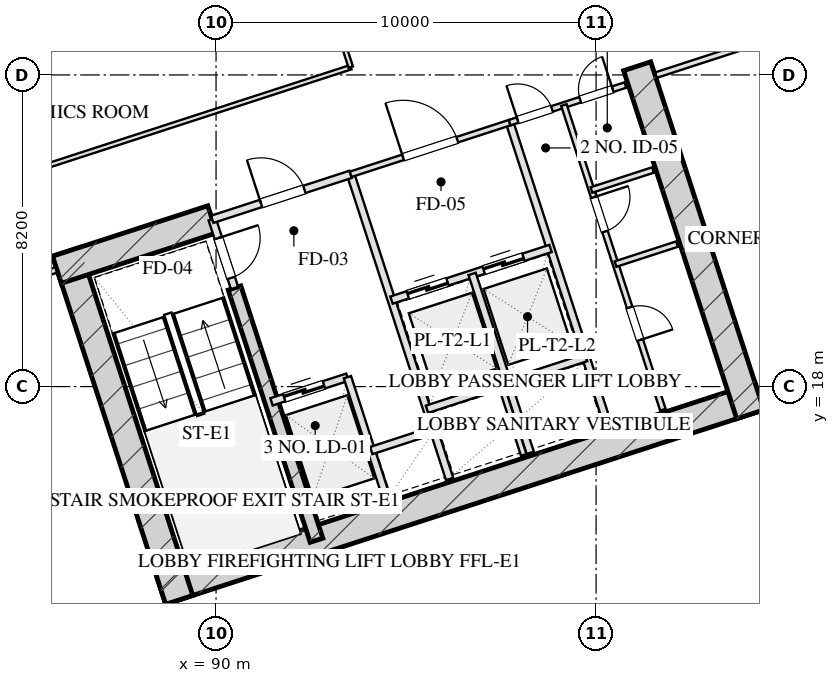
"""IFC4 building model, lengths in metres.
Left out: names, types, materials, properties, quantities, classifications, styles, units other than length and angle.
Written with IfcOpenShell. Run it as: python <this file> out.ifc"""

import sys

from ifc_helpers import new_model, si_unit, direction, frame, frame_2d, origin, place, context, subcontext, project, spatial, rectangle, extrude, element, fill, save


model = new_model("IFC4")
c1 = context("Model", 3, precision=1e-05, world=origin(), true_north=direction((0.0, 1.0)))
c2 = subcontext(c1, "Body", "Model", "MODEL_VIEW")
j1 = project(units=[si_unit("LENGTHUNIT", "METRE"), si_unit("PLANEANGLEUNIT", "RADIAN")], contexts=[c1])
p1 = place(None, origin())
s1 = spatial("IfcSite", under=j1, at=p1, CompositionType="ELEMENT")
p2 = place(p1, origin())
s2 = spatial("IfcBuilding", under=s1, at=p2, CompositionType="ELEMENT")
p3 = place(p2, frame((0.0, 0.0, 85.1)))
s3 = spatial("IfcBuildingStorey", under=s2, at=p3, CompositionType="ELEMENT", Elevation=85.1)
p4 = place(p3, frame((88.559, 12.629, 0.0), z_axis=(0.0, 0.0, 1.0), x_axis=(0.951056072937, 0.309018358888, 0.0)))
e1 = element("IfcWall", 1, at=p4, inside=s3, PredefinedType="SHEAR", context=c2, shape_type="SweptSolid", body=[
    extrude(rectangle(XDim=16.55, YDim=0.75, at=frame_2d((8.275, 0.0))), origin(), (0.0, 0.0, 1.0), 3.45),
])
p5 = place(p3, frame((86.055, 21.546, 0.0), z_axis=(0.0, 0.0, 1.0), x_axis=(0.309023585745, -0.951054374604, 0.0)))
e2 = element("IfcWall", 2, at=p5, inside=s3, PredefinedType="SHEAR", context=c2, shape_type="SweptSolid", body=[
    extrude(rectangle(XDim=9.63, YDim=0.75, at=frame_2d((4.815, 0.0))), origin(), (0.0, 0.0, 1.0), 3.45),
])
p6 = place(p3, frame((101.082, 26.429, 0.0), z_axis=(0.0, 0.0, 1.0), x_axis=(0.309016134813, -0.951056795583, 0.0)))
e3 = element("IfcWall", 3, at=p6, inside=s3, PredefinedType="SHEAR", context=c2, shape_type="SweptSolid", body=[
    extrude(rectangle(XDim=9.63, YDim=0.75, at=frame_2d((4.815, 0.0))), origin(), (0.0, 0.0, 1.0), 3.45),
])
p7 = place(p3, frame((90.486, 20.594, 0.0), z_axis=(0.0, 0.0, 1.0), x_axis=(0.309020428229, -0.951055400562, 0.0)))
e4 = element("IfcWall", 4, at=p7, inside=s3, PredefinedType="SHEAR", context=c2, shape_type="SweptSolid", body=[
    extrude(rectangle(XDim=6.98, YDim=0.35, at=frame_2d((3.49, 0.0))), origin(), (0.0, 0.0, 1.0), 3.45),
])
p8 = place(p3, frame((85.814, 21.074, 0.0), z_axis=(0.0, 0.0, 1.0), x_axis=(0.95106580992, 0.308988390074, 0.0)))
e5 = element("IfcWall", 5, at=p8, inside=s3, PredefinedType="SHEAR", context=c2, shape_type="SweptSolid", body=[
    extrude(rectangle(XDim=4.295, YDim=0.75, at=frame_2d((2.147, 0.0))), origin(), (0.0, 0.0, 1.0), 3.45),
])
p9 = place(p3, frame((99.284, 61.41, 0.0), z_axis=(0.0, 0.0, 1.0), x_axis=(0.309017542002, -0.95105633836, 0.0)))
e6 = element("IfcWall", 6, at=p9, inside=s3, PredefinedType="SOLIDWALL", context=c2, shape_type="SweptSolid", body=[
    extrude(rectangle(XDim=46.4, YDim=0.4, at=frame_2d((23.2, 0.0))), origin(), (0.0, 0.0, 1.0), 2.61),
])
p10 = place(p9, frame((28.4, 0.0, 0.75)))
e7 = element("IfcOpeningElement", 7, at=p10, cuts=e6, PredefinedType="OPENING", context=c2, shape_type="SweptSolid", body=[
    extrude(rectangle(XDim=2.4, YDim=1.46, at=frame_2d((1.2, 0.73))), frame((0.0, 0.21, 0.0), z_axis=(0.0, -1.0, 0.0), x_axis=(1.0, 0.0, 0.0)), (0.0, 0.0, 1.0), 0.42),
])
p11 = place(p9, frame((19.4, 0.0, 0.75)))
e8 = element("IfcOpeningElement", 8, at=p11, cuts=e6, PredefinedType="OPENING", context=c2, shape_type="SweptSolid", body=[
    extrude(rectangle(XDim=2.4, YDim=1.46, at=frame_2d((1.2, 0.73))), frame((0.0, 0.21, 0.0), z_axis=(0.0, -1.0, 0.0), x_axis=(1.0, 0.0, 0.0)), (0.0, 0.0, 1.0), 0.42),
])
p12 = place(p9, frame((15.6, 0.0, 0.75)))
e9 = element("IfcOpeningElement", 9, at=p12, cuts=e6, PredefinedType="OPENING", context=c2, shape_type="SweptSolid", body=[
    extrude(rectangle(XDim=2.4, YDim=1.46, at=frame_2d((1.2, 0.73))), frame((0.0, 0.21, 0.0), z_axis=(0.0, -1.0, 0.0), x_axis=(1.0, 0.0, 0.0)), (0.0, 0.0, 1.0), 0.42),
])
p13 = place(p3, frame((111.953, 14.005, 0.0), z_axis=(0.0, 0.0, 1.0), x_axis=(-0.95105505922, -0.309021478754, 0.0)))
e10 = element("IfcWall", 10, at=p13, inside=s3, PredefinedType="SOLIDWALL", context=c2, shape_type="SweptSolid", body=[
    extrude(rectangle(XDim=29.4, YDim=0.4, at=frame_2d((14.7, 0.0))), origin(), (0.0, 0.0, 1.0), 2.61),
])
p14 = place(p3, frame((89.899, 22.401, 0.0), z_axis=(0.0, 0.0, 1.0), x_axis=(0.308932062672, -0.951084108086, 0.0)))
e11 = element("IfcWall", 11, at=p14, inside=s3, PredefinedType="PARTITIONING", context=c2, shape_type="SweptSolid", body=[
    extrude(rectangle(XDim=1.9, YDim=0.2, at=frame_2d((0.95, 0.0))), origin(), (0.0, 0.0, 1.0), 3.175),
])
p15 = place(p14, frame((0.52, 0.0, 0.0)))
e12 = element("IfcOpeningElement", 12, at=p15, cuts=e11, PredefinedType="OPENING", context=c2, shape_type="SweptSolid", body=[
    extrude(rectangle(XDim=1.1, YDim=2.05, at=frame_2d((0.55, 1.025))), frame((0.0, 0.11, 0.0), z_axis=(0.0, -1.0, 0.0), x_axis=(1.0, 0.0, 0.0)), (0.0, 0.0, 1.0), 0.22),
])
p16 = place(p3, frame((93.542, 23.585, 0.0), z_axis=(0.0, 0.0, 1.0), x_axis=(0.309042196757, -0.951048327176, 0.0)))
e13 = element("IfcWall", 13, at=p16, inside=s3, PredefinedType="PARTITIONING", context=c2, shape_type="SweptSolid", body=[
    extrude(rectangle(XDim=8.43, YDim=0.2, at=frame_2d((4.215, 0.0))), origin(), (0.0, 0.0, 1.0), 3.175),
])
p17 = place(p3, frame((89.899, 22.401, 0.0), z_axis=(0.0, 0.0, 1.0), x_axis=(0.951046716504, 0.309047153403, 0.0)))
e14 = element("IfcWall", 14, at=p17, inside=s3, PredefinedType="PARTITIONING", context=c2, shape_type="SweptSolid", body=[
    extrude(rectangle(XDim=3.83, YDim=0.2, at=frame_2d((1.915, 0.0))), origin(), (0.0, 0.0, 1.0), 3.175),
])
p18 = place(p17, frame((1.35, 0.0, 0.0)))
e15 = element("IfcOpeningElement", 15, at=p18, cuts=e14, PredefinedType="OPENING", context=c2, shape_type="SweptSolid", body=[
    extrude(rectangle(XDim=1.2, YDim=2.05, at=frame_2d((0.6, 1.025))), frame((0.0, 0.11, 0.0), z_axis=(0.0, -1.0, 0.0), x_axis=(1.0, 0.0, 0.0)), (0.0, 0.0, 1.0), 0.22),
])
p19 = place(p3, frame((91.46, 17.598, 0.0), z_axis=(0.0, 0.0, 1.0), x_axis=(0.951062257173, 0.308999325213, 0.0)))
e16 = element("IfcWall", 16, at=p19, inside=s3, PredefinedType="PARTITIONING", context=c2, shape_type="SweptSolid", body=[
    extrude(rectangle(XDim=2.1, YDim=0.2, at=frame_2d((1.05, 0.0))), origin(), (0.0, 0.0, 1.0), 3.175),
])
p20 = place(p19, frame((0.35, 0.0, 0.0)))
e17 = element("IfcOpeningElement", 17, at=p20, cuts=e16, PredefinedType="OPENING", context=c2, shape_type="SweptSolid", body=[
    extrude(rectangle(XDim=1.1, YDim=2.05, at=frame_2d((0.55, 1.025))), frame((0.0, 0.11, 0.0), z_axis=(0.0, -1.0, 0.0), x_axis=(1.0, 0.0, 0.0)), (0.0, 0.0, 1.0), 0.22),
])
p21 = place(p3, frame((93.457, 18.247, 0.0), z_axis=(0.0, 0.0, 1.0), x_axis=(0.3089935693, -0.951064127245, 0.0)))
e18 = element("IfcWall", 18, at=p21, inside=s3, PredefinedType="PARTITIONING", context=c2, shape_type="SweptSolid", body=[
    extrude(rectangle(XDim=3.7, YDim=0.2, at=frame_2d((1.85, 0.0))), origin(), (0.0, 0.0, 1.0), 3.175),
])
p22 = place(p3, frame((94.084, 16.317, 0.0), z_axis=(0.0, 0.0, 1.0), x_axis=(0.951041328149, 0.309063734775, 0.0)))
e19 = element("IfcWall", 19, at=p22, inside=s3, PredefinedType="PARTITIONING", context=c2, shape_type="SweptSolid", body=[
    extrude(rectangle(XDim=1.73, YDim=0.2, at=frame_2d((0.865, 0.0))), origin(), (0.0, 0.0, 1.0), 3.175),
])
p23 = place(p3, frame((97.727, 24.944, 0.0), z_axis=(0.0, 0.0, 1.0), x_axis=(0.309016001439, -0.951056838919, 0.0)))
e20 = element("IfcWall", 20, at=p23, inside=s3, PredefinedType="PARTITIONING", context=c2, shape_type="SweptSolid", body=[
    extrude(rectangle(XDim=8.43, YDim=0.2, at=frame_2d((4.215, 0.0))), origin(), (0.0, 0.0, 1.0), 3.175),
])
p24 = place(p3, frame((93.542, 23.585, 0.0), z_axis=(0.0, 0.0, 1.0), x_axis=(0.951063829732, 0.308994485023, 0.0)))
e21 = element("IfcWall", 21, at=p24, inside=s3, PredefinedType="PARTITIONING", context=c2, shape_type="SweptSolid", body=[
    extrude(rectangle(XDim=4.4, YDim=0.15, at=frame_2d((2.2, 0.0))), origin(), (0.0, 0.0, 1.0), 3.175),
])
p25 = place(p24, frame((1.45, 0.0, 0.0)))
e22 = element("IfcOpeningElement", 22, at=p25, cuts=e21, PredefinedType="OPENING", context=c2, shape_type="SweptSolid", body=[
    extrude(rectangle(XDim=1.5, YDim=2.05, at=frame_2d((0.75, 1.025))), frame((0.0, 0.085, 0.0), z_axis=(0.0, -1.0, 0.0), x_axis=(1.0, 0.0, 0.0)), (0.0, 0.0, 1.0), 0.17),
])
p26 = place(p3, frame((94.617, 20.275, 0.0), z_axis=(0.0, 0.0, 1.0), x_axis=(0.951058531764, 0.30901079133, 0.0)))
e23 = element("IfcWall", 23, at=p26, inside=s3, PredefinedType="PARTITIONING", context=c2, shape_type="SweptSolid", body=[
    extrude(rectangle(XDim=4.4, YDim=0.2, at=frame_2d((2.2, 0.0))), origin(), (0.0, 0.0, 1.0), 3.175),
])
p27 = place(p26, frame((0.45, 0.0, 0.0)))
e24 = element("IfcOpeningElement", 24, at=p27, cuts=e23, PredefinedType="OPENING", context=c2, shape_type="SweptSolid", body=[
    extrude(rectangle(XDim=1.1, YDim=2.05, at=frame_2d((0.55, 1.025))), frame((0.0, 0.11, 0.0), z_axis=(0.0, -1.0, 0.0), x_axis=(1.0, 0.0, 0.0)), (0.0, 0.0, 1.0), 0.22),
])
p28 = place(p26, frame((2.55, 0.0, 0.0)))
e25 = element("IfcOpeningElement", 25, at=p28, cuts=e23, PredefinedType="OPENING", context=c2, shape_type="SweptSolid", body=[
    extrude(rectangle(XDim=1.1, YDim=2.05, at=frame_2d((0.55, 1.025))), frame((0.0, 0.11, 0.0), z_axis=(0.0, -1.0, 0.0), x_axis=(1.0, 0.0, 0.0)), (0.0, 0.0, 1.0), 0.22),
])
p29 = place(p3, frame((96.738, 20.964, 0.0), z_axis=(0.0, 0.0, 1.0), x_axis=(0.309042578481, -0.951048203135, 0.0)))
e26 = element("IfcWall", 26, at=p29, inside=s3, PredefinedType="PARTITIONING", context=c2, shape_type="SweptSolid", body=[
    extrude(rectangle(XDim=4.95, YDim=0.2, at=frame_2d((2.475, 0.0))), origin(), (0.0, 0.0, 1.0), 3.175),
])
p30 = place(p3, frame((95.551, 17.403, 0.0), z_axis=(0.0, 0.0, 1.0), x_axis=(0.951058531764, 0.30901079133, 0.0)))
e27 = element("IfcWall", 27, at=p30, inside=s3, PredefinedType="PARTITIONING", context=c2, shape_type="SweptSolid", body=[
    extrude(rectangle(XDim=4.4, YDim=0.2, at=frame_2d((2.2, 0.0))), origin(), (0.0, 0.0, 1.0), 3.175),
])
p31 = place(p3, frame((97.516, 17.989, 0.0), z_axis=(0.0, 0.0, 1.0), x_axis=(0.30897153969, -0.951071284217, 0.0)))
e28 = element("IfcWall", 28, at=p31, inside=s3, PredefinedType="PARTITIONING", context=c2, shape_type="SweptSolid", body=[
    extrude(rectangle(XDim=1.88, YDim=0.15, at=frame_2d((0.94, 0.0))), origin(), (0.0, 0.0, 1.0), 3.175),
])
p32 = place(p3, frame((97.727, 24.944, 0.0), z_axis=(0.0, 0.0, 1.0), x_axis=(0.951036872128, 0.309077446369, 0.0)))
e29 = element("IfcWall", 29, at=p32, inside=s3, PredefinedType="PARTITIONING", context=c2, shape_type="SweptSolid", body=[
    extrude(rectangle(XDim=3.2, YDim=0.15, at=frame_2d((1.6, 0.0))), origin(), (0.0, 0.0, 1.0), 3.175),
])
p33 = place(p32, frame((0.22, 0.0, 0.0)))
e30 = element("IfcOpeningElement", 30, at=p33, cuts=e29, PredefinedType="OPENING", context=c2, shape_type="SweptSolid", body=[
    extrude(rectangle(XDim=0.95, YDim=2.05, at=frame_2d((0.475, 1.025))), frame((0.0, 0.085, 0.0), z_axis=(0.0, -1.0, 0.0), x_axis=(1.0, 0.0, 0.0)), (0.0, 0.0, 1.0), 0.17),
])
p34 = place(p32, frame((1.95, 0.0, 0.0)))
e31 = element("IfcOpeningElement", 31, at=p34, cuts=e29, PredefinedType="OPENING", context=c2, shape_type="SweptSolid", body=[
    extrude(rectangle(XDim=0.9, YDim=2.05, at=frame_2d((0.45, 1.025))), frame((0.0, 0.085, 0.0), z_axis=(0.0, -1.0, 0.0), x_axis=(1.0, 0.0, 0.0)), (0.0, 0.0, 1.0), 0.17),
])
p35 = place(p3, frame((99.153, 25.408, 0.0), z_axis=(0.0, 0.0, 1.0), x_axis=(0.309016001439, -0.951056838919, 0.0)))
e32 = element("IfcWall", 32, at=p35, inside=s3, PredefinedType="PARTITIONING", context=c2, shape_type="SweptSolid", body=[
    extrude(rectangle(XDim=8.43, YDim=0.15, at=frame_2d((4.215, 0.0))), origin(), (0.0, 0.0, 1.0), 3.175),
])
p36 = place(p35, frame((2.55, 0.0, 0.0)))
e33 = element("IfcOpeningElement", 33, at=p36, cuts=e32, PredefinedType="OPENING", context=c2, shape_type="SweptSolid", body=[
    extrude(rectangle(XDim=0.95, YDim=2.05, at=frame_2d((0.475, 1.025))), frame((0.0, 0.085, 0.0), z_axis=(0.0, -1.0, 0.0), x_axis=(1.0, 0.0, 0.0)), (0.0, 0.0, 1.0), 0.17),
])
p37 = place(p35, frame((5.6, 0.0, 0.0)))
e34 = element("IfcOpeningElement", 34, at=p37, cuts=e32, PredefinedType="OPENING", context=c2, shape_type="SweptSolid", body=[
    extrude(rectangle(XDim=0.9, YDim=2.05, at=frame_2d((0.45, 1.025))), frame((0.0, 0.085, 0.0), z_axis=(0.0, -1.0, 0.0), x_axis=(1.0, 0.0, 0.0)), (0.0, 0.0, 1.0), 0.17),
])
for number, where, z_axis, x_axis in (
    (35, (100.513, 21.223, 0.0), (0.0, 0.0, 1.0), (0.951, 0.309, 0.0)),
    (36, (99.879, 23.173, 0.0), (0.0, 0.0, 1.0), (0.951, 0.309, 0.0)),
):
    element("IfcWall", number, at=place(p3, frame(where, z_axis=z_axis, x_axis=x_axis)), inside=s3, PredefinedType="PARTITIONING", context=c2, shape_type="SweptSolid", body=[
        extrude(rectangle(XDim=1.7, YDim=0.15, at=frame_2d((0.85, 0.0))), origin(), (0.0, 0.0, 1.0), 3.175),
    ])
p38 = place(p3, frame((77.136, 18.254, 0.0), z_axis=(0.0, 0.0, 1.0), x_axis=(0.951057133767, 0.309015093986, 0.0)))
e37 = element("IfcWall", 37, at=p38, inside=s3, PredefinedType="PARTITIONING", context=c2, shape_type="SweptSolid", body=[
    extrude(rectangle(XDim=9.1, YDim=0.15, at=frame_2d((4.55, 0.0))), origin(), (0.0, 0.0, 1.0), 3.175),
])
p39 = place(p38, frame((3.822, 0.0, 0.0)))
e38 = element("IfcOpeningElement", 38, at=p39, cuts=e37, PredefinedType="OPENING", context=c2, shape_type="SweptSolid", body=[
    extrude(rectangle(XDim=1.0, YDim=2.05, at=frame_2d((0.5, 1.025))), frame((0.0, 0.085, 0.0), z_axis=(0.0, -1.0, 0.0), x_axis=(1.0, 0.0, 0.0)), (0.0, 0.0, 1.0), 0.17),
])
p40 = place(p3, frame((101.578, 26.196, 0.0), z_axis=(0.0, 0.0, 1.0), x_axis=(0.951062770994, 0.308997743729, 0.0)))
e39 = element("IfcWall", 39, at=p40, inside=s3, PredefinedType="PARTITIONING", context=c2, shape_type="SweptSolid", body=[
    extrude(rectangle(XDim=8.5, YDim=0.15, at=frame_2d((4.25, 0.0))), origin(), (0.0, 0.0, 1.0), 3.175),
])
p41 = place(p40, frame((3.57, 0.0, 0.0)))
e40 = element("IfcOpeningElement", 40, at=p41, cuts=e39, PredefinedType="OPENING", context=c2, shape_type="SweptSolid", body=[
    extrude(rectangle(XDim=0.85, YDim=2.05, at=frame_2d((0.425, 1.025))), frame((0.0, 0.085, 0.0), z_axis=(0.0, -1.0, 0.0), x_axis=(1.0, 0.0, 0.0)), (0.0, 0.0, 1.0), 0.17),
])
p42 = place(p3, frame((76.308, 20.803, 0.0), z_axis=(0.0, 0.0, 1.0), x_axis=(0.951054952586, 0.309021806935, 0.0)))
e41 = element("IfcWall", 41, at=p42, inside=s3, PredefinedType="PARTITIONING", context=c2, shape_type="SweptSolid", body=[
    extrude(rectangle(XDim=18.125, YDim=0.12, at=frame_2d((9.062, 0.0))), origin(), (0.0, 0.0, 1.0), 3.175),
])
p43 = place(p3, frame((93.546, 26.404, 0.0), z_axis=(0.0, 0.0, 1.0), x_axis=(-0.309022042254, 0.951054876125, 0.0)))
e42 = element("IfcWall", 42, at=p43, inside=s3, PredefinedType="PARTITIONING", context=c2, shape_type="SweptSolid", body=[
    extrude(rectangle(XDim=16.64, YDim=0.12, at=frame_2d((8.32, 0.0))), origin(), (0.0, 0.0, 1.0), 3.175),
])
p44 = place(p43, frame((1.16, 0.0, 0.0)))
e43 = element("IfcOpeningElement", 43, at=p44, cuts=e42, PredefinedType="OPENING", context=c2, shape_type="SweptSolid", body=[
    extrude(rectangle(XDim=1.0, YDim=2.05, at=frame_2d((0.5, 1.025))), frame((0.0, 0.07, 0.0), z_axis=(0.0, -1.0, 0.0), x_axis=(1.0, 0.0, 0.0)), (0.0, 0.0, 1.0), 0.14),
])
p45 = place(p43, frame((4.72, 0.0, 0.0)))
e44 = element("IfcOpeningElement", 44, at=p45, cuts=e42, PredefinedType="OPENING", context=c2, shape_type="SweptSolid", body=[
    extrude(rectangle(XDim=1.05, YDim=2.05, at=frame_2d((0.525, 1.025))), frame((0.0, 0.07, 0.0), z_axis=(0.0, -1.0, 0.0), x_axis=(1.0, 0.0, 0.0)), (0.0, 0.0, 1.0), 0.14),
])
p46 = place(p43, frame((7.823, 0.0, 0.0)))
e45 = element("IfcOpeningElement", 45, at=p46, cuts=e42, PredefinedType="OPENING", context=c2, shape_type="SweptSolid", body=[
    extrude(rectangle(XDim=1.0, YDim=2.05, at=frame_2d((0.5, 1.025))), frame((0.0, 0.07, 0.0), z_axis=(0.0, -1.0, 0.0), x_axis=(1.0, 0.0, 0.0)), (0.0, 0.0, 1.0), 0.14),
])
p47 = place(p43, frame((10.69, 0.0, 0.0)))
e46 = element("IfcOpeningElement", 46, at=p47, cuts=e42, PredefinedType="OPENING", context=c2, shape_type="SweptSolid", body=[
    extrude(rectangle(XDim=1.0, YDim=2.05, at=frame_2d((0.5, 1.025))), frame((0.0, 0.07, 0.0), z_axis=(0.0, -1.0, 0.0), x_axis=(1.0, 0.0, 0.0)), (0.0, 0.0, 1.0), 0.14),
])
p48 = place(p43, frame((14.247, 0.0, 0.0)))
e47 = element("IfcOpeningElement", 47, at=p48, cuts=e42, PredefinedType="OPENING", context=c2, shape_type="SweptSolid", body=[
    extrude(rectangle(XDim=1.0, YDim=2.05, at=frame_2d((0.5, 1.025))), frame((0.0, 0.07, 0.0), z_axis=(0.0, -1.0, 0.0), x_axis=(1.0, 0.0, 0.0)), (0.0, 0.0, 1.0), 0.14),
])
p49 = place(p3, frame((75.282, 23.96, 0.0), z_axis=(0.0, 0.0, 1.0), x_axis=(0.951054952586, 0.309021806935, 0.0)))
e48 = element("IfcWall", 48, at=p49, inside=s3, PredefinedType="PARTITIONING", context=c2, shape_type="SweptSolid", body=[
    extrude(rectangle(XDim=18.125, YDim=0.12, at=frame_2d((9.062, 0.0))), origin(), (0.0, 0.0, 1.0), 3.175),
])
p50 = place(p15, origin())
e49 = element("IfcDoor", 49, at=p50, inside=s3, OperationType="SINGLE_SWING_LEFT", PredefinedType="DOOR", context=c2, shape_type="SweptSolid", body=[
    extrude(rectangle(XDim=1.1, YDim=2.05, at=frame_2d((0.55, 1.025))), frame((0.0, 0.025, 0.0), z_axis=(0.0, -1.0, 0.0), x_axis=(1.0, 0.0, 0.0)), (0.0, 0.0, 1.0), 0.05),
])
fill(e12, e49)
p51 = place(p18, origin())
e50 = element("IfcDoor", 50, at=p51, inside=s3, OperationType="SINGLE_SWING_LEFT", PredefinedType="DOOR", context=c2, shape_type="SweptSolid", body=[
    extrude(rectangle(XDim=1.2, YDim=2.05, at=frame_2d((0.6, 1.025))), frame((0.0, 0.025, 0.0), z_axis=(0.0, -1.0, 0.0), x_axis=(1.0, 0.0, 0.0)), (0.0, 0.0, 1.0), 0.05),
])
fill(e15, e50)
p52 = place(p20, origin())
e51 = element("IfcDoor", 51, at=p52, inside=s3, OperationType="DOUBLE_DOOR_SLIDING", PredefinedType="DOOR", context=c2, shape_type="SweptSolid", body=[
    extrude(rectangle(XDim=1.1, YDim=2.05, at=frame_2d((0.55, 1.025))), frame((0.0, 0.025, 0.0), z_axis=(0.0, -1.0, 0.0), x_axis=(1.0, 0.0, 0.0)), (0.0, 0.0, 1.0), 0.05),
])
fill(e17, e51)
p53 = place(p25, origin())
e52 = element("IfcDoor", 52, at=p53, inside=s3, OperationType="SINGLE_SWING_LEFT", PredefinedType="DOOR", context=c2, shape_type="SweptSolid", body=[
    extrude(rectangle(XDim=1.5, YDim=2.05, at=frame_2d((0.75, 1.025))), frame((0.0, 0.025, 0.0), z_axis=(0.0, -1.0, 0.0), x_axis=(1.0, 0.0, 0.0)), (0.0, 0.0, 1.0), 0.05),
])
fill(e22, e52)
p54 = place(p27, origin())
e53 = element("IfcDoor", 53, at=p54, inside=s3, OperationType="DOUBLE_DOOR_SLIDING", PredefinedType="DOOR", context=c2, shape_type="SweptSolid", body=[
    extrude(rectangle(XDim=1.1, YDim=2.05, at=frame_2d((0.55, 1.025))), frame((0.0, 0.025, 0.0), z_axis=(0.0, -1.0, 0.0), x_axis=(1.0, 0.0, 0.0)), (0.0, 0.0, 1.0), 0.05),
])
fill(e24, e53)
p55 = place(p28, origin())
e54 = element("IfcDoor", 54, at=p55, inside=s3, OperationType="DOUBLE_DOOR_SLIDING", PredefinedType="DOOR", context=c2, shape_type="SweptSolid", body=[
    extrude(rectangle(XDim=1.1, YDim=2.05, at=frame_2d((0.55, 1.025))), frame((0.0, 0.025, 0.0), z_axis=(0.0, -1.0, 0.0), x_axis=(1.0, 0.0, 0.0)), (0.0, 0.0, 1.0), 0.05),
])
fill(e25, e54)
p56 = place(p33, origin())
e55 = element("IfcDoor", 55, at=p56, inside=s3, OperationType="SINGLE_SWING_LEFT", PredefinedType="DOOR", context=c2, shape_type="SweptSolid", body=[
    extrude(rectangle(XDim=0.95, YDim=2.05, at=frame_2d((0.475, 1.025))), frame((0.0, 0.025, 0.0), z_axis=(0.0, -1.0, 0.0), x_axis=(1.0, 0.0, 0.0)), (0.0, 0.0, 1.0), 0.05),
])
fill(e30, e55)
p57 = place(p34, origin())
e56 = element("IfcDoor", 56, at=p57, inside=s3, OperationType="SINGLE_SWING_RIGHT", PredefinedType="DOOR", context=c2, shape_type="SweptSolid", body=[
    extrude(rectangle(XDim=0.9, YDim=2.05, at=frame_2d((0.45, 1.025))), frame((0.0, 0.025, 0.0), z_axis=(0.0, -1.0, 0.0), x_axis=(1.0, 0.0, 0.0)), (0.0, 0.0, 1.0), 0.05),
])
fill(e31, e56)
p58 = place(p36, origin())
e57 = element("IfcDoor", 57, at=p58, inside=s3, OperationType="SINGLE_SWING_LEFT", PredefinedType="DOOR", context=c2, shape_type="SweptSolid", body=[
    extrude(rectangle(XDim=0.95, YDim=2.05, at=frame_2d((0.475, 1.025))), frame((0.0, 0.025, 0.0), z_axis=(0.0, -1.0, 0.0), x_axis=(1.0, 0.0, 0.0)), (0.0, 0.0, 1.0), 0.05),
])
fill(e33, e57)
p59 = place(p37, origin())
e58 = element("IfcDoor", 58, at=p59, inside=s3, OperationType="SINGLE_SWING_RIGHT", PredefinedType="DOOR", context=c2, shape_type="SweptSolid", body=[
    extrude(rectangle(XDim=0.9, YDim=2.05, at=frame_2d((0.45, 1.025))), frame((0.0, 0.025, 0.0), z_axis=(0.0, -1.0, 0.0), x_axis=(1.0, 0.0, 0.0)), (0.0, 0.0, 1.0), 0.05),
])
fill(e34, e58)
save(model, sys.argv[1])
